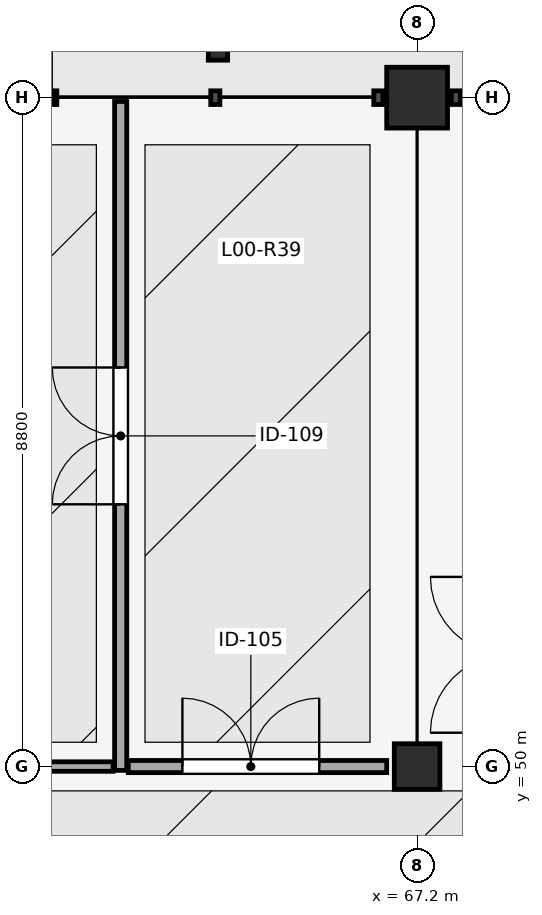
"""IFC4 building model, lengths in metres.
Left out: names, types, materials, properties, quantities, classifications, styles, units other than length and angle.
Written with IfcOpenShell. Run it as: python <this file> out.ifc"""

import sys

from ifc_helpers import new_model, si_unit, direction, frame, frame_2d, origin, origin_2d, place, context, subcontext, project, spatial, rectangle, hollow_rectangle, extrude, element, fill, save


model = new_model("IFC4")
c1 = context("Model", 3, precision=1e-05, world=origin(), true_north=direction((0.0, 1.0)))
c2 = subcontext(c1, "Body", "Model", "MODEL_VIEW")
j1 = project(units=[si_unit("LENGTHUNIT", "METRE"), si_unit("PLANEANGLEUNIT", "RADIAN")], contexts=[c1])
p1 = place(None, origin())
s1 = spatial("IfcSite", under=j1, at=p1, CompositionType="ELEMENT")
p2 = place(p1, origin())
s2 = spatial("IfcBuilding", under=s1, at=p2, CompositionType="ELEMENT")
p3 = place(p2, origin())
s3 = spatial("IfcBuildingStorey", under=s2, at=p3, CompositionType="ELEMENT", Elevation=0.0)
p4 = place(p3, frame((67.2, 50.0, 0.0), z_axis=(0.0, 0.0, 1.0), x_axis=(1.0, 0.0, 0.0)))
e1 = element("IfcColumn", 1, at=p4, inside=s3, PredefinedType="COLUMN", context=c2, shape_type="SweptSolid", body=[
    extrude(rectangle(XDim=0.6, YDim=0.6, at=origin_2d()), origin(), (0.0, 0.0, 1.0), 4.8),
])
p5 = place(p3, frame((67.2, 58.8, 0.0), z_axis=(0.0, 0.0, 1.0), x_axis=(1.0, 0.0, 0.0)))
e2 = element("IfcColumn", 2, at=p5, inside=s3, PredefinedType="COLUMN", context=c2, shape_type="SweptSolid", body=[
    extrude(rectangle(XDim=0.8, YDim=0.8, at=origin_2d()), origin(), (0.0, 0.0, 1.0), 4.8),
])
p6 = place(p3, frame((64.58, 59.42, 0.0), z_axis=(0.0, 0.0, 1.0), x_axis=(1.0, 0.0, 0.0)))
e3 = element("IfcColumn", 3, at=p6, inside=s3, PredefinedType="COLUMN", context=c2, shape_type="SweptSolid", body=[
    extrude(hollow_rectangle(XDim=0.254, YDim=0.254, WallThickness=0.012, at=origin_2d()), origin(), (0.0, 0.0, 1.0), 3.47),
])
p7 = place(p3, frame((57.7, 50.0, 0.0), z_axis=(0.0, 0.0, 1.0), x_axis=(1.0, 0.0, 0.0)))
e4 = element("IfcWall", 4, at=p7, inside=s3, PredefinedType="PARTITIONING", context=c2, shape_type="SweptSolid", body=[
    extrude(rectangle(XDim=5.5, YDim=0.125, at=frame_2d((2.75, 0.0))), origin(), (0.0, 0.0, 1.0), 3.925),
])
p8 = place(p3, frame((63.4, 50.0, 0.0), z_axis=(0.0, 0.0, 1.0), x_axis=(1.0, 0.0, 0.0)))
e5 = element("IfcWall", 5, at=p8, inside=s3, PredefinedType="PARTITIONING", context=c2, shape_type="SweptSolid", body=[
    extrude(rectangle(XDim=3.4, YDim=0.16, at=frame_2d((1.7, 0.0))), origin(), (0.0, 0.0, 1.0), 3.925),
])
p9 = place(p8, frame((0.712, 0.0, 0.0)))
e6 = element("IfcOpeningElement", 6, at=p9, cuts=e5, PredefinedType="OPENING", context=c2, shape_type="SweptSolid", body=[
    extrude(rectangle(XDim=1.8, YDim=2.15, at=frame_2d((0.9, 1.075))), frame((0.0, 0.09, 0.0), z_axis=(0.0, -1.0, 0.0), x_axis=(1.0, 0.0, 0.0)), (0.0, 0.0, 1.0), 0.18),
])
p10 = place(p3, frame((63.3, 49.95, 0.0), z_axis=(0.0, 0.0, 1.0), x_axis=(0.0, 1.0, 0.0)))
e7 = element("IfcWall", 7, at=p10, inside=s3, PredefinedType="PARTITIONING", context=c2, shape_type="SweptSolid", body=[
    extrude(rectangle(XDim=8.8, YDim=0.16, at=frame_2d((4.4, 0.0))), origin(), (0.0, 0.0, 1.0), 4.42),
])
p11 = place(p10, frame((3.5, 0.0, 0.0)))
e8 = element("IfcOpeningElement", 8, at=p11, cuts=e7, PredefinedType="OPENING", context=c2, shape_type="SweptSolid", body=[
    extrude(rectangle(XDim=1.8, YDim=2.15, at=frame_2d((0.9, 1.075))), frame((0.0, 0.09, 0.0), z_axis=(0.0, -1.0, 0.0), x_axis=(1.0, 0.0, 0.0)), (0.0, 0.0, 1.0), 0.18),
])
p12 = place(p9, origin())
e9 = element("IfcDoor", 9, at=p12, inside=s3, OperationType="DOUBLE_DOOR_SINGLE_SWING", PredefinedType="DOOR", context=c2, shape_type="SweptSolid", body=[
    extrude(rectangle(XDim=1.8, YDim=2.15, at=frame_2d((0.9, 1.075))), frame((0.0, 0.025, 0.0), z_axis=(0.0, -1.0, 0.0), x_axis=(1.0, 0.0, 0.0)), (0.0, 0.0, 1.0), 0.05),
])
fill(e6, e9)
p13 = place(p11, origin())
e10 = element("IfcDoor", 10, at=p13, inside=s3, OperationType="DOUBLE_DOOR_SINGLE_SWING", PredefinedType="DOOR", context=c2, shape_type="SweptSolid", body=[
    extrude(rectangle(XDim=1.8, YDim=2.15, at=frame_2d((0.9, 1.075))), frame((0.0, 0.025, 0.0), z_axis=(0.0, -1.0, 0.0), x_axis=(1.0, 0.0, 0.0)), (0.0, 0.0, 1.0), 0.05),
])
fill(e8, e10)
save(model, sys.argv[1])
